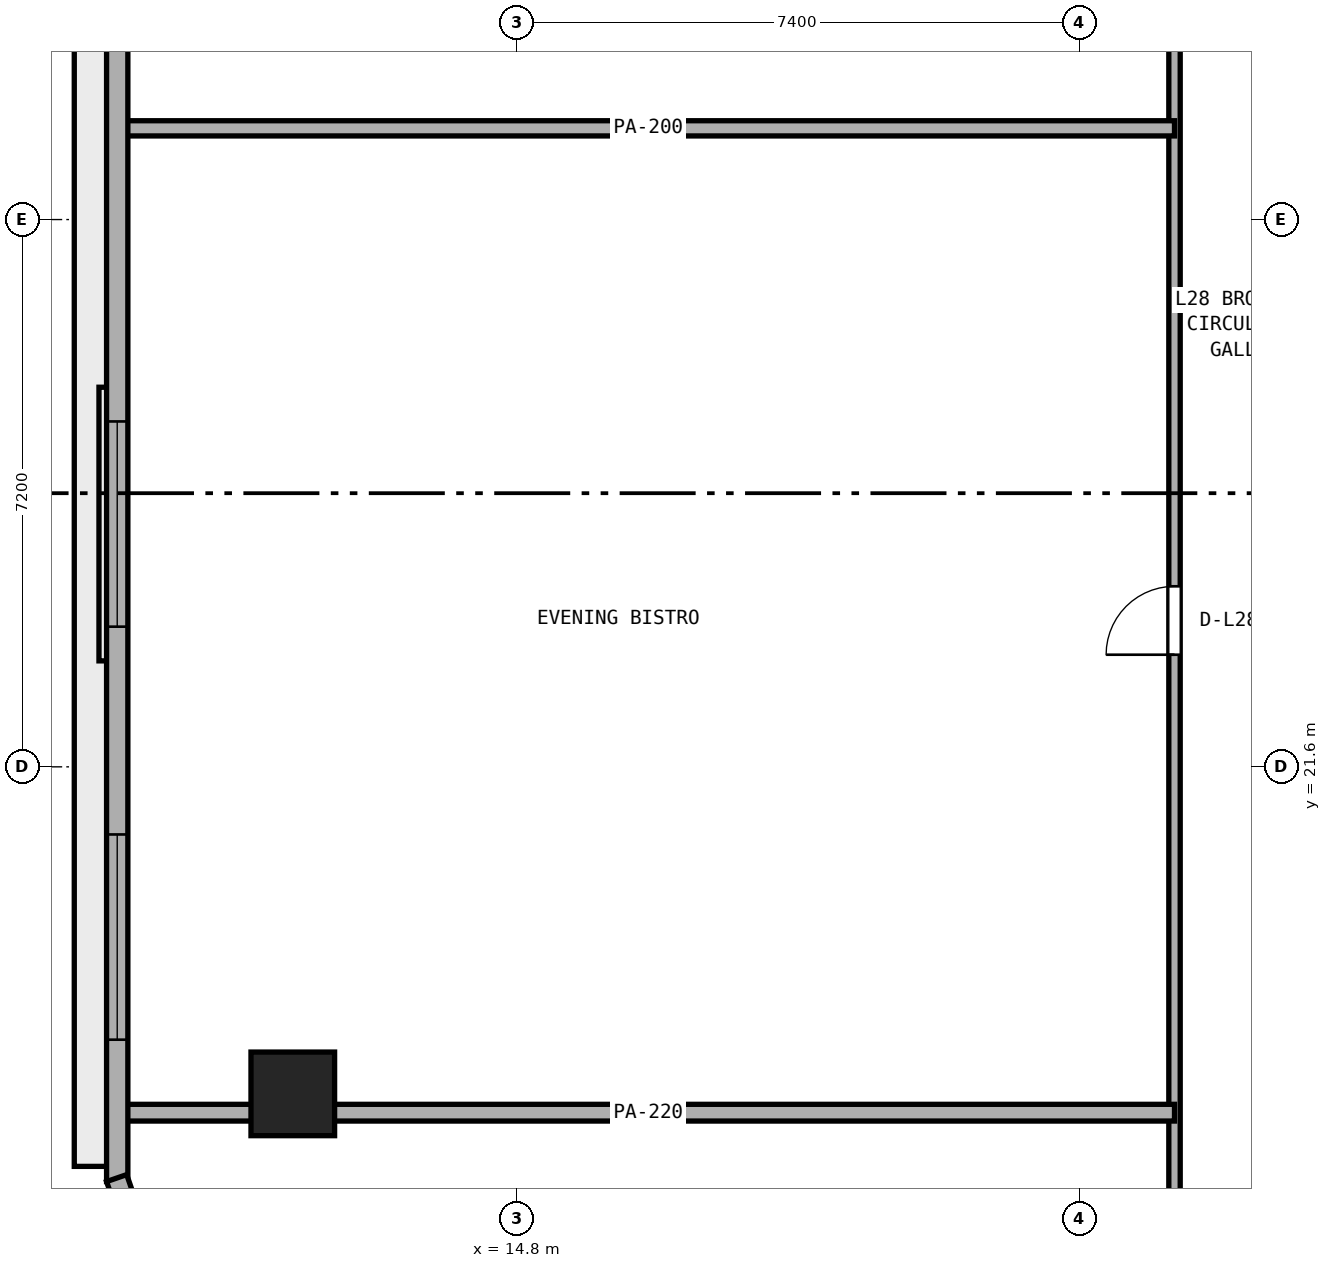
"""IFC4 building model, lengths in metres.
Left out: names, types, materials, properties, quantities, classifications, styles, units other than length and angle.
Written with IfcOpenShell. Run it as: python <this file> out.ifc"""

import sys

from ifc_helpers import new_model, si_unit, direction, frame, frame_2d, origin, origin_2d, place, context, subcontext, project, spatial, rectangle, extrude, element, fill, save


model = new_model("IFC4")
c1 = context("Model", 3, precision=1e-05, world=origin(), true_north=direction((0.0, 1.0)))
c2 = subcontext(c1, "Body", "Model", "MODEL_VIEW")
j1 = project(units=[si_unit("LENGTHUNIT", "METRE"), si_unit("PLANEANGLEUNIT", "RADIAN")], contexts=[c1])
p1 = place(None, origin())
s1 = spatial("IfcSite", under=j1, at=p1, CompositionType="ELEMENT")
p2 = place(p1, origin())
s2 = spatial("IfcBuilding", under=s1, at=p2, CompositionType="ELEMENT")
p3 = place(p2, frame((0.0, 0.0, 112.4)))
s3 = spatial("IfcBuildingStorey", under=s2, at=p3, CompositionType="ELEMENT", Elevation=112.4)
p4 = place(p3, frame((11.85, 17.298, 0.0), z_axis=(0.0, 0.0, 1.0), x_axis=(1.0, 0.0, 0.0)))
e1 = element("IfcColumn", 1, at=p4, inside=s3, PredefinedType="COLUMN", context=c2, shape_type="SweptSolid", body=[
    extrude(rectangle(XDim=1.1, YDim=1.1, at=origin_2d()), origin(), (0.0, 0.0, 1.0), 3.8),
])
p5 = place(p3, frame((23.45, 15.05, 0.0), z_axis=(0.0, 0.0, 1.0), x_axis=(0.0, 1.0, 0.0)))
e2 = element("IfcWall", 2, at=p5, inside=s3, PredefinedType="PARTITIONING", context=c2, shape_type="SweptSolid", body=[
    extrude(rectangle(XDim=20.3, YDim=0.15, at=frame_2d((10.15, 0.0))), origin(), (0.0, 0.0, 1.0), 3.525),
])
p6 = place(p5, frame((8.025, 0.0, 0.0)))
e3 = element("IfcOpeningElement", 3, at=p6, cuts=e2, PredefinedType="OPENING", context=c2, shape_type="SweptSolid", body=[
    extrude(rectangle(XDim=0.9, YDim=2.1, at=frame_2d((0.45, 1.05))), frame((0.0, 0.085, 0.0), z_axis=(0.0, -1.0, 0.0), x_axis=(1.0, 0.0, 0.0)), (0.0, 0.0, 1.0), 0.17),
])
p7 = place(p5, frame((16.175, 0.0, 0.0)))
e4 = element("IfcOpeningElement", 4, at=p7, cuts=e2, PredefinedType="OPENING", context=c2, shape_type="SweptSolid", body=[
    extrude(rectangle(XDim=0.9, YDim=2.1, at=frame_2d((0.45, 1.05))), frame((0.0, 0.085, 0.0), z_axis=(0.0, -1.0, 0.0), x_axis=(1.0, 0.0, 0.0)), (0.0, 0.0, 1.0), 0.17),
])
p8 = place(p3, frame((9.605, 17.05, 0.0), z_axis=(0.0, 0.0, 1.0), x_axis=(1.0, 0.0, 0.0)))
e5 = element("IfcWall", 5, at=p8, inside=s3, PredefinedType="PARTITIONING", context=c2, shape_type="SweptSolid", body=[
    extrude(rectangle(XDim=13.845, YDim=0.22, at=frame_2d((6.922, 0.0))), origin(), (0.0, 0.0, 1.0), 2.908),
])
p9 = place(p3, frame((9.605, 30.0, 0.0), z_axis=(0.0, 0.0, 1.0), x_axis=(1.0, 0.0, 0.0)))
e6 = element("IfcWall", 6, at=p9, inside=s3, PredefinedType="PARTITIONING", context=c2, shape_type="SweptSolid", body=[
    extrude(rectangle(XDim=13.845, YDim=0.2, at=frame_2d((6.922, 0.0))), origin(), (0.0, 0.0, 1.0), 3.525),
])
p10 = place(p3, frame((9.54, 33.444, 0.0), z_axis=(0.0, 0.0, 1.0), x_axis=(0.0, -1.0, 0.0)))
e7 = element("IfcWall", 7, at=p10, inside=s3, PredefinedType="STANDARD", context=c2, shape_type="SweptSolid", body=[
    extrude(rectangle(XDim=17.301, YDim=0.28, at=frame_2d((8.65, 0.0))), origin(), (0.0, 0.0, 1.0), 3.525),
])
p11 = place(p10, frame((7.3, 0.0, 0.9)))
e8 = element("IfcOpeningElement", 8, at=p11, cuts=e7, PredefinedType="OPENING", context=c2, shape_type="SweptSolid", body=[
    extrude(rectangle(XDim=2.7, YDim=1.75, at=frame_2d((1.35, 0.875))), frame((0.0, 0.15, 0.0), z_axis=(0.0, -1.0, 0.0), x_axis=(1.0, 0.0, 0.0)), (0.0, 0.0, 1.0), 0.3),
])
p12 = place(p10, frame((12.734, 0.0, 0.9)))
e9 = element("IfcOpeningElement", 9, at=p12, cuts=e7, PredefinedType="OPENING", context=c2, shape_type="SweptSolid", body=[
    extrude(rectangle(XDim=2.7, YDim=1.75, at=frame_2d((1.35, 0.875))), frame((0.0, 0.15, 0.0), z_axis=(0.0, -1.0, 0.0), x_axis=(1.0, 0.0, 0.0)), (0.0, 0.0, 1.0), 0.3),
])
p13 = place(p3, frame((9.532, 16.189, 0.0), z_axis=(0.0, 0.0, 1.0), x_axis=(0.32708309668, -0.944995580871, 0.0)))
e10 = element("IfcWall", 10, at=p13, inside=s3, PredefinedType="STANDARD", context=c2, shape_type="SweptSolid", body=[
    extrude(rectangle(XDim=2.748, YDim=0.28, at=frame_2d((1.374, 0.0))), origin(), (0.0, 0.0, 1.0), 3.525),
])
p14 = place(p6, origin())
e11 = element("IfcDoor", 11, at=p14, inside=s3, OperationType="SINGLE_SWING_LEFT", PredefinedType="DOOR", context=c2, shape_type="SweptSolid", body=[
    extrude(rectangle(XDim=0.9, YDim=2.1, at=frame_2d((0.45, 1.05))), frame((0.0, 0.025, 0.0), z_axis=(0.0, -1.0, 0.0), x_axis=(1.0, 0.0, 0.0)), (0.0, 0.0, 1.0), 0.05),
])
fill(e3, e11)
p15 = place(p11, origin())
e12 = element("IfcWindow", 12, at=p15, inside=s3, PartitioningType="SINGLE_PANEL", PredefinedType="WINDOW", context=c2, shape_type="SweptSolid", body=[
    extrude(rectangle(XDim=2.7, YDim=1.75, at=frame_2d((1.35, 0.875))), frame((0.0, 0.03, 0.0), z_axis=(0.0, -1.0, 0.0), x_axis=(1.0, 0.0, 0.0)), (0.0, 0.0, 1.0), 0.06),
])
fill(e8, e12)
p16 = place(p12, origin())
e13 = element("IfcWindow", 13, at=p16, inside=s3, PartitioningType="SINGLE_PANEL", PredefinedType="WINDOW", context=c2, shape_type="SweptSolid", body=[
    extrude(rectangle(XDim=2.7, YDim=1.75, at=frame_2d((1.35, 0.875))), frame((0.0, 0.03, 0.0), z_axis=(0.0, -1.0, 0.0), x_axis=(1.0, 0.0, 0.0)), (0.0, 0.0, 1.0), 0.06),
])
fill(e9, e13)
save(model, sys.argv[1])
